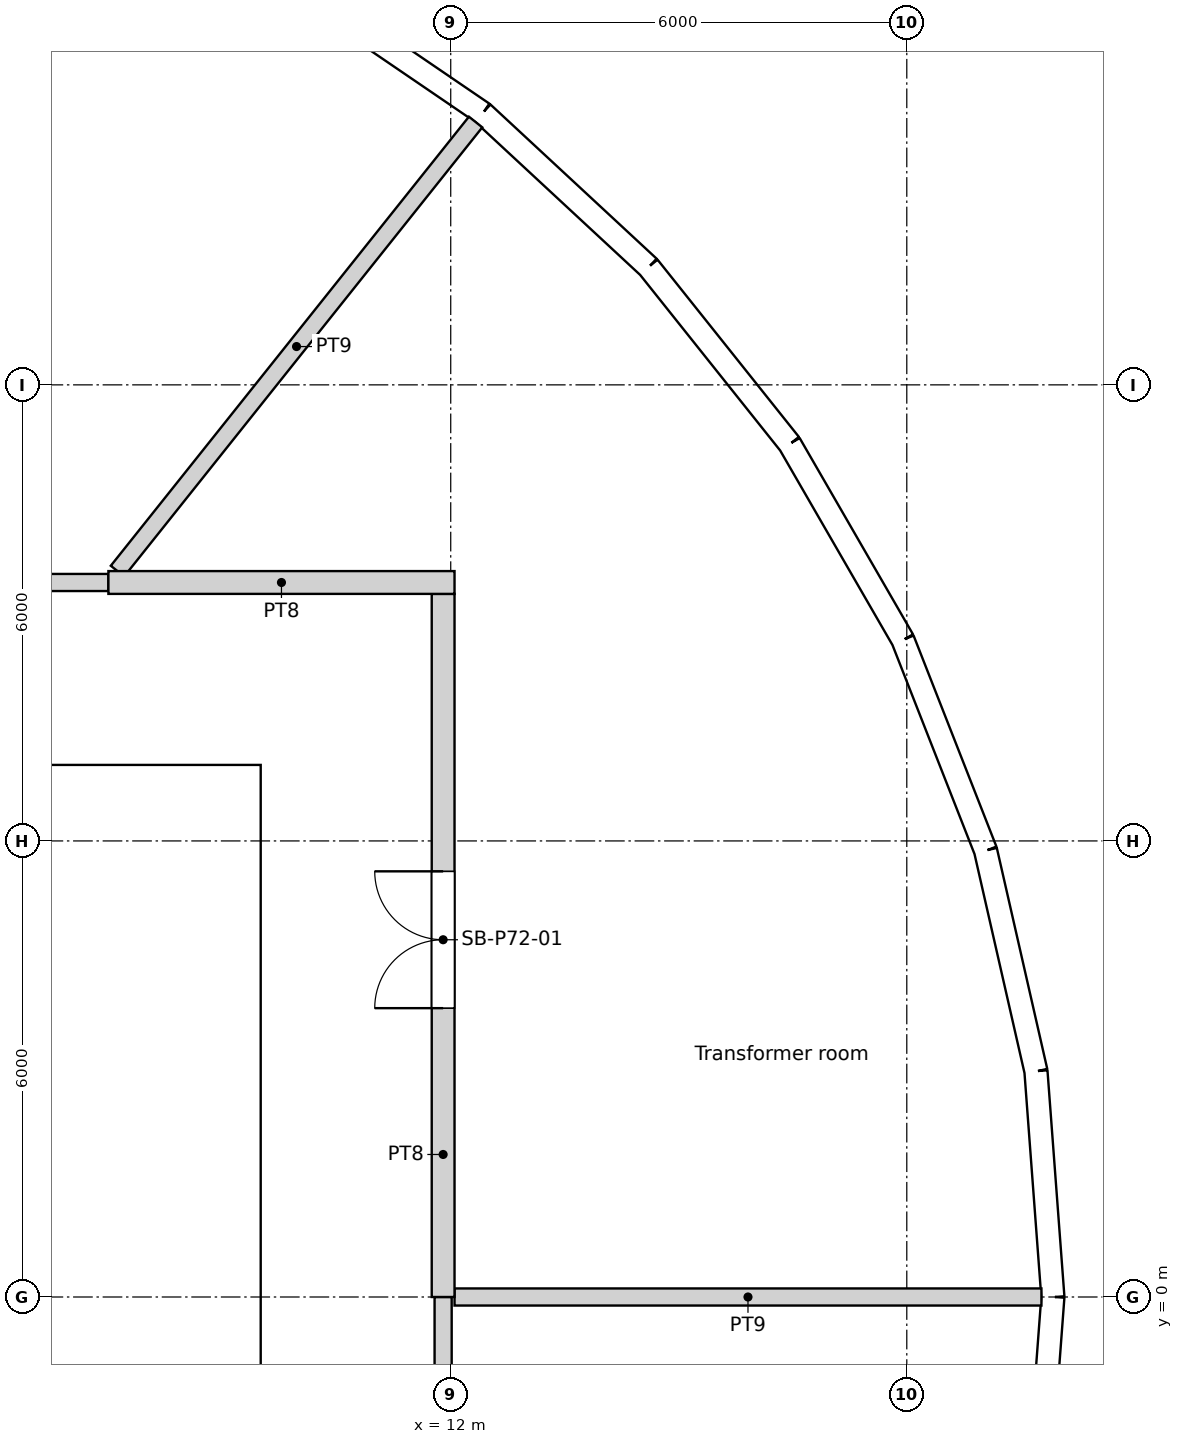
"""IFC4 building model, lengths in metres.
Left out: names, types, materials, properties, quantities, classifications, styles, units other than length and angle.
Written with IfcOpenShell. Run it as: python <this file> out.ifc"""

import sys

from ifc_helpers import new_model, si_unit, direction, frame, frame_2d, origin, origin_2d, place, context, subcontext, project, spatial, rectangle, circle, extrude, element, fill, save


model = new_model("IFC4")
c1 = context("Model", 3, precision=1e-05, world=origin(), true_north=direction((0.0, 1.0)))
c2 = subcontext(c1, "Body", "Model", "MODEL_VIEW")
j1 = project(units=[si_unit("LENGTHUNIT", "METRE"), si_unit("PLANEANGLEUNIT", "RADIAN")], contexts=[c1])
p1 = place(None, origin())
s1 = spatial("IfcSite", under=j1, at=p1, CompositionType="ELEMENT")
p2 = place(p1, origin())
s2 = spatial("IfcBuilding", under=s1, at=p2, CompositionType="ELEMENT")
p3 = place(p2, frame((0.0, 0.0, 277.8)))
s3 = spatial("IfcBuildingStorey", under=s2, at=p3, CompositionType="ELEMENT", Elevation=277.8)
for number, where, z_axis, x_axis in (
    (1, (18.822, 0.0, 0.0), (0.0, 0.0, 1.0), (1.0, 0.0, 0.0)),
    (2, (17.986, 5.548, 0.0), (0.0, 0.0, 1.0), (1.0, 0.0, 0.0)),
    (3, (15.552, 10.603, 0.0), (0.0, 0.0, 1.0), (1.0, 0.0, 0.0)),
    (4, (11.735, 14.716, 0.0), (0.0, 0.0, 1.0), (1.0, 0.0, 0.0)),
):
    element("IfcColumn", number, at=place(p3, frame(where, z_axis=z_axis, x_axis=x_axis)), inside=s3, PredefinedType="COLUMN", context=c2, shape_type="SweptSolid", body=[
        extrude(circle(Radius=0.55, at=origin_2d()), origin(), (0.0, 0.0, 1.0), 6.0),
    ])
p4 = place(p3, frame((19.922, 0.0, 0.0), z_axis=(0.0, 0.0, 1.0), x_axis=(-0.074777718064, 0.997200227076, 0.0)))
e5 = element("IfcWall", 5, at=p4, inside=s3, PredefinedType="SOLIDWALL", context=c2, shape_type="SweptSolid", body=[
    extrude(rectangle(XDim=2.978, YDim=0.3, at=frame_2d((1.489, 0.0))), origin(), (0.0, 0.0, 1.0), 5.65),
])
p5 = place(p4, frame((1.489, 0.0, 1.825)))
e6 = element("IfcOpeningElement", 6, at=p5, cuts=e5, PredefinedType="OPENING", context=c2, shape_type="SweptSolid", body=[
    extrude(circle(Radius=1.2, at=origin_2d()), frame((0.0, 0.16, 0.0), z_axis=(0.0, -1.0, 0.0), x_axis=(1.0, 0.0, 0.0)), (0.0, 0.0, 1.0), 0.32),
])
p6 = place(p3, frame((19.699, 2.969, 0.0), z_axis=(0.0, 0.0, 1.0), x_axis=(-0.222535358937, 0.974924619662, 0.0)))
e7 = element("IfcWall", 7, at=p6, inside=s3, PredefinedType="SOLIDWALL", context=c2, shape_type="SweptSolid", body=[
    extrude(rectangle(XDim=2.978, YDim=0.3, at=frame_2d((1.489, 0.0))), origin(), (0.0, 0.0, 1.0), 5.2),
])
p7 = place(p6, frame((1.489, 0.0, 1.825)))
e8 = element("IfcOpeningElement", 8, at=p7, cuts=e7, PredefinedType="OPENING", context=c2, shape_type="SweptSolid", body=[
    extrude(circle(Radius=1.2, at=origin_2d()), frame((0.0, 0.16, 0.0), z_axis=(0.0, -1.0, 0.0), x_axis=(1.0, 0.0, 0.0)), (0.0, 0.0, 1.0), 0.32),
])
p8 = place(p3, frame((19.037, 5.872, 0.0), z_axis=(0.0, 0.0, 1.0), x_axis=(-0.365289571566, 0.930893940739, 0.0)))
e9 = element("IfcWall", 9, at=p8, inside=s3, PredefinedType="SOLIDWALL", context=c2, shape_type="SweptSolid", body=[
    extrude(rectangle(XDim=2.978, YDim=0.3, at=frame_2d((1.489, 0.0))), origin(), (0.0, 0.0, 1.0), 5.65),
])
p9 = place(p8, frame((1.489, 0.0, 1.825)))
e10 = element("IfcOpeningElement", 10, at=p9, cuts=e9, PredefinedType="OPENING", context=c2, shape_type="SweptSolid", body=[
    extrude(circle(Radius=1.2, at=origin_2d()), frame((0.0, 0.16, 0.0), z_axis=(0.0, -1.0, 0.0), x_axis=(1.0, 0.0, 0.0)), (0.0, 0.0, 1.0), 0.32),
])
p10 = place(p3, frame((17.949, 8.644, 0.0), z_axis=(0.0, 0.0, 1.0), x_axis=(-0.500001626982, 0.866024464444, 0.0)))
e11 = element("IfcWall", 11, at=p10, inside=s3, PredefinedType="SOLIDWALL", context=c2, shape_type="SweptSolid", body=[
    extrude(rectangle(XDim=2.978, YDim=0.3, at=frame_2d((1.489, 0.0))), origin(), (0.0, 0.0, 1.0), 5.65),
])
p11 = place(p10, frame((1.489, 0.0, 1.825)))
e12 = element("IfcOpeningElement", 12, at=p11, cuts=e11, PredefinedType="OPENING", context=c2, shape_type="SweptSolid", body=[
    extrude(circle(Radius=1.2, at=origin_2d()), frame((0.0, 0.16, 0.0), z_axis=(0.0, -1.0, 0.0), x_axis=(1.0, 0.0, 0.0)), (0.0, 0.0, 1.0), 0.32),
])
p12 = place(p3, frame((16.46, 11.222, 0.0), z_axis=(0.0, 0.0, 1.0), x_axis=(-0.623494374707, 0.781827835722, 0.0)))
e13 = element("IfcWall", 13, at=p12, inside=s3, PredefinedType="SOLIDWALL", context=c2, shape_type="SweptSolid", body=[
    extrude(rectangle(XDim=2.978, YDim=0.3, at=frame_2d((1.489, 0.0))), origin(), (0.0, 0.0, 1.0), 5.2),
])
p13 = place(p12, frame((1.489, 0.0, 1.825)))
e14 = element("IfcOpeningElement", 14, at=p13, cuts=e13, PredefinedType="OPENING", context=c2, shape_type="SweptSolid", body=[
    extrude(circle(Radius=1.2, at=origin_2d()), frame((0.0, 0.16, 0.0), z_axis=(0.0, -1.0, 0.0), x_axis=(1.0, 0.0, 0.0)), (0.0, 0.0, 1.0), 0.32),
])
p14 = place(p3, frame((14.604, 13.55, 0.0), z_axis=(0.0, 0.0, 1.0), x_axis=(-0.733056277766, 0.68016798927, 0.0)))
e15 = element("IfcWall", 15, at=p14, inside=s3, PredefinedType="SOLIDWALL", context=c2, shape_type="SweptSolid", body=[
    extrude(rectangle(XDim=2.978, YDim=0.3, at=frame_2d((1.489, 0.0))), origin(), (0.0, 0.0, 1.0), 5.65),
])
p15 = place(p14, frame((1.489, 0.0, 1.825)))
e16 = element("IfcOpeningElement", 16, at=p15, cuts=e15, PredefinedType="OPENING", context=c2, shape_type="SweptSolid", body=[
    extrude(circle(Radius=1.2, at=origin_2d()), frame((0.0, 0.16, 0.0), z_axis=(0.0, -1.0, 0.0), x_axis=(1.0, 0.0, 0.0)), (0.0, 0.0, 1.0), 0.32),
])
p16 = place(p3, frame((12.421, 15.575, 0.0), z_axis=(0.0, 0.0, 1.0), x_axis=(-0.826253362584, 0.56329866041, 0.0)))
e17 = element("IfcWall", 17, at=p16, inside=s3, PredefinedType="SOLIDWALL", context=c2, shape_type="SweptSolid", body=[
    extrude(rectangle(XDim=2.978, YDim=0.3, at=frame_2d((1.489, 0.0))), origin(), (0.0, 0.0, 1.0), 5.65),
])
p17 = place(p16, frame((1.489, 0.0, 1.825)))
e18 = element("IfcOpeningElement", 18, at=p17, cuts=e17, PredefinedType="OPENING", context=c2, shape_type="SweptSolid", body=[
    extrude(circle(Radius=1.2, at=origin_2d()), frame((0.0, 0.16, 0.0), z_axis=(0.0, -1.0, 0.0), x_axis=(1.0, 0.0, 0.0)), (0.0, 0.0, 1.0), 0.32),
])
p18 = place(p3, frame((19.699, -2.969, 0.0), z_axis=(0.0, 0.0, 1.0), x_axis=(0.074777718064, 0.997200227076, 0.0)))
e19 = element("IfcWall", 19, at=p18, inside=s3, PredefinedType="SOLIDWALL", context=c2, shape_type="SweptSolid", body=[
    extrude(rectangle(XDim=2.978, YDim=0.3, at=frame_2d((1.489, 0.0))), origin(), (0.0, 0.0, 1.0), 5.65),
])
p19 = place(p18, frame((1.489, 0.0, 1.825)))
e20 = element("IfcOpeningElement", 20, at=p19, cuts=e19, PredefinedType="OPENING", context=c2, shape_type="SweptSolid", body=[
    extrude(circle(Radius=1.2, at=origin_2d()), frame((0.0, 0.16, 0.0), z_axis=(0.0, -1.0, 0.0), x_axis=(1.0, 0.0, 0.0)), (0.0, 0.0, 1.0), 0.32),
])
p20 = place(p3, frame((-9.5, 6.7, 0.0), z_axis=(0.0, 0.0, 1.0), x_axis=(1.0, 0.0, 0.0)))
e21 = element("IfcWall", 21, at=p20, inside=s3, PredefinedType="SOLIDWALL", context=c2, shape_type="SweptSolid", body=[
    extrude(rectangle(XDim=19.0, YDim=0.6, at=frame_2d((9.5, 0.0))), origin(), (0.0, 0.0, 1.0), 6.0),
])
p21 = place(p20, frame((5.35, 0.0, 0.0)))
e22 = element("IfcOpeningElement", 22, at=p21, cuts=e21, PredefinedType="OPENING", context=c2, shape_type="SweptSolid", body=[
    extrude(rectangle(XDim=1.7, YDim=2.1, at=frame_2d((0.85, 1.05))), frame((0.0, 0.3, 0.0), z_axis=(0.0, -1.0, 0.0), x_axis=(1.0, 0.0, 0.0)), (0.0, 0.0, 1.0), 0.6),
])
p22 = place(p3, frame((9.2, -6.4, 0.0), z_axis=(0.0, 0.0, 1.0), x_axis=(0.0, 1.0, 0.0)))
e23 = element("IfcWall", 23, at=p22, inside=s3, PredefinedType="SOLIDWALL", context=c2, shape_type="SweptSolid", body=[
    extrude(rectangle(XDim=12.8, YDim=0.6, at=frame_2d((6.4, 0.0))), origin(), (0.0, 0.0, 1.0), 6.0),
])
p23 = place(p22, frame((6.4, 0.0, 0.0)))
e24 = element("IfcOpeningElement", 24, at=p23, cuts=e23, PredefinedType="OPENING", context=c2, shape_type="SweptSolid", body=[
    extrude(rectangle(XDim=1.8, YDim=2.1, at=frame_2d((0.9, 1.05))), frame((0.0, 0.3, 0.0), z_axis=(0.0, -1.0, 0.0), x_axis=(1.0, 0.0, 0.0)), (0.0, 0.0, 1.0), 0.6),
])
p24 = place(p3, frame((-4.35, 3.1, 0.0), z_axis=(0.0, 0.0, 1.0), x_axis=(1.0, 0.0, 0.0)))
e25 = element("IfcWall", 25, at=p24, inside=s3, PredefinedType="SOLIDWALL", context=c2, shape_type="SweptSolid", body=[
    extrude(rectangle(XDim=13.25, YDim=0.3, at=frame_2d((6.625, 0.0))), origin(), (0.0, 0.0, 1.0), 5.65),
])
p25 = place(p3, frame((7.496, 9.4, 0.0), z_axis=(0.0, 0.0, 1.0), x_axis=(-1.0, 0.0, 0.0)))
e26 = element("IfcWall", 26, at=p25, inside=s3, PredefinedType="PARTITIONING", context=c2, shape_type="SweptSolid", body=[
    extrude(rectangle(XDim=6.792, YDim=0.225, at=frame_2d((3.396, 0.0))), origin(), (0.0, 0.0, 1.0), 5.65),
])
p26 = place(p25, frame((2.496, 0.0, 0.0)))
e27 = element("IfcOpeningElement", 27, at=p26, cuts=e26, PredefinedType="OPENING", context=c2, shape_type="SweptSolid", body=[
    extrude(rectangle(XDim=1.8, YDim=2.4, at=frame_2d((0.9, 1.2))), frame((0.0, 0.113, 0.0), z_axis=(0.0, -1.0, 0.0), x_axis=(1.0, 0.0, 0.0)), (0.0, 0.0, 1.0), 0.225),
])
p27 = place(p3, frame((11.9, -9.512, 0.0), z_axis=(0.0, 0.0, 1.0), x_axis=(0.0, 1.0, 0.0)))
e28 = element("IfcWall", 28, at=p27, inside=s3, PredefinedType="PARTITIONING", context=c2, shape_type="SweptSolid", body=[
    extrude(rectangle(XDim=9.512, YDim=0.225, at=frame_2d((4.756, 0.0))), origin(), (0.0, 0.0, 1.0), 5.65),
])
p28 = place(p27, frame((4.312, 0.0, 0.0)))
e29 = element("IfcOpeningElement", 29, at=p28, cuts=e28, PredefinedType="OPENING", context=c2, shape_type="SweptSolid", body=[
    extrude(rectangle(XDim=1.0, YDim=2.1, at=frame_2d((0.5, 1.05))), frame((0.0, 0.113, 0.0), z_axis=(0.0, -1.0, 0.0), x_axis=(1.0, 0.0, 0.0)), (0.0, 0.0, 1.0), 0.225),
])
p29 = place(p3, frame((11.9, 0.0, 0.0), z_axis=(0.0, 0.0, 1.0), x_axis=(0.0, 1.0, 0.0)))
e30 = element("IfcWall", 30, at=p29, inside=s3, PredefinedType="PARTITIONING", context=c2, shape_type="SweptSolid", body=[
    extrude(rectangle(XDim=9.25, YDim=0.3, at=frame_2d((4.625, 0.0))), origin(), (0.0, 0.0, 1.0), 5.65),
])
p30 = place(p29, frame((3.8, 0.0, 0.0)))
e31 = element("IfcOpeningElement", 31, at=p30, cuts=e30, PredefinedType="OPENING", context=c2, shape_type="SweptSolid", body=[
    extrude(rectangle(XDim=1.8, YDim=2.4, at=frame_2d((0.9, 1.2))), frame((0.0, 0.15, 0.0), z_axis=(0.0, -1.0, 0.0), x_axis=(1.0, 0.0, 0.0)), (0.0, 0.0, 1.0), 0.3),
])
p31 = place(p3, frame((12.05, 9.4, 0.0), z_axis=(0.0, 0.0, 1.0), x_axis=(-1.0, 0.0, 0.0)))
e32 = element("IfcWall", 32, at=p31, inside=s3, PredefinedType="PARTITIONING", context=c2, shape_type="SweptSolid", body=[
    extrude(rectangle(XDim=4.554, YDim=0.3, at=frame_2d((2.277, 0.0))), origin(), (0.0, 0.0, 1.0), 5.65),
])
p32 = place(p3, frame((12.327, 15.458, 0.0), z_axis=(0.0, 0.0, 1.0), x_axis=(-0.623488645806, -0.781832404388, 0.0)))
e33 = element("IfcWall", 33, at=p32, inside=s3, PredefinedType="PARTITIONING", context=c2, shape_type="SweptSolid", body=[
    extrude(rectangle(XDim=7.557, YDim=0.225, at=frame_2d((3.778, 0.0))), origin(), (0.0, 0.0, 1.0), 2.7),
])
p33 = place(p3, frame((19.771, 0.0, 0.0), z_axis=(0.0, 0.0, 1.0), x_axis=(-1.0, 0.0, 0.0)))
e34 = element("IfcWall", 34, at=p33, inside=s3, PredefinedType="PARTITIONING", context=c2, shape_type="SweptSolid", body=[
    extrude(rectangle(XDim=7.721, YDim=0.225, at=frame_2d((3.861, 0.0))), origin(), (0.0, 0.0, 1.0), 2.7),
])
p34 = place(p5, origin())
e35 = element("IfcWindow", 35, at=p34, inside=s3, PartitioningType="SINGLE_PANEL", PredefinedType="WINDOW", context=c2, shape_type="SweptSolid", body=[
    extrude(circle(Radius=1.2, at=origin_2d()), frame((0.0, 0.12, 0.0), z_axis=(0.0, -1.0, 0.0), x_axis=(1.0, 0.0, 0.0)), (0.0, 0.0, 1.0), 0.1),
])
fill(e6, e35)
p35 = place(p7, origin())
e36 = element("IfcWindow", 36, at=p35, inside=s3, PartitioningType="SINGLE_PANEL", PredefinedType="WINDOW", context=c2, shape_type="SweptSolid", body=[
    extrude(circle(Radius=1.2, at=origin_2d()), frame((0.0, 0.12, 0.0), z_axis=(0.0, -1.0, 0.0), x_axis=(1.0, 0.0, 0.0)), (0.0, 0.0, 1.0), 0.1),
])
fill(e8, e36)
p36 = place(p9, origin())
e37 = element("IfcWindow", 37, at=p36, inside=s3, PartitioningType="SINGLE_PANEL", PredefinedType="WINDOW", context=c2, shape_type="SweptSolid", body=[
    extrude(circle(Radius=1.2, at=origin_2d()), frame((0.0, 0.12, 0.0), z_axis=(0.0, -1.0, 0.0), x_axis=(1.0, 0.0, 0.0)), (0.0, 0.0, 1.0), 0.1),
])
fill(e10, e37)
p37 = place(p11, origin())
e38 = element("IfcWindow", 38, at=p37, inside=s3, PartitioningType="SINGLE_PANEL", PredefinedType="WINDOW", context=c2, shape_type="SweptSolid", body=[
    extrude(circle(Radius=1.2, at=origin_2d()), frame((0.0, 0.12, 0.0), z_axis=(0.0, -1.0, 0.0), x_axis=(1.0, 0.0, 0.0)), (0.0, 0.0, 1.0), 0.1),
])
fill(e12, e38)
p38 = place(p13, origin())
e39 = element("IfcWindow", 39, at=p38, inside=s3, PartitioningType="SINGLE_PANEL", PredefinedType="WINDOW", context=c2, shape_type="SweptSolid", body=[
    extrude(circle(Radius=1.2, at=origin_2d()), frame((0.0, 0.12, 0.0), z_axis=(0.0, -1.0, 0.0), x_axis=(1.0, 0.0, 0.0)), (0.0, 0.0, 1.0), 0.1),
])
fill(e14, e39)
p39 = place(p15, origin())
e40 = element("IfcWindow", 40, at=p39, inside=s3, PartitioningType="SINGLE_PANEL", PredefinedType="WINDOW", context=c2, shape_type="SweptSolid", body=[
    extrude(circle(Radius=1.2, at=origin_2d()), frame((0.0, 0.12, 0.0), z_axis=(0.0, -1.0, 0.0), x_axis=(1.0, 0.0, 0.0)), (0.0, 0.0, 1.0), 0.1),
])
fill(e16, e40)
p40 = place(p17, origin())
e41 = element("IfcWindow", 41, at=p40, inside=s3, PartitioningType="SINGLE_PANEL", PredefinedType="WINDOW", context=c2, shape_type="SweptSolid", body=[
    extrude(circle(Radius=1.2, at=origin_2d()), frame((0.0, 0.12, 0.0), z_axis=(0.0, -1.0, 0.0), x_axis=(1.0, 0.0, 0.0)), (0.0, 0.0, 1.0), 0.1),
])
fill(e18, e41)
p41 = place(p19, origin())
e42 = element("IfcWindow", 42, at=p41, inside=s3, PartitioningType="SINGLE_PANEL", PredefinedType="WINDOW", context=c2, shape_type="SweptSolid", body=[
    extrude(circle(Radius=1.2, at=origin_2d()), frame((0.0, 0.12, 0.0), z_axis=(0.0, -1.0, 0.0), x_axis=(1.0, 0.0, 0.0)), (0.0, 0.0, 1.0), 0.1),
])
fill(e20, e42)
p42 = place(p23, origin())
e43 = element("IfcDoor", 43, at=p42, inside=s3, OperationType="DOUBLE_DOOR_SINGLE_SWING", PredefinedType="DOOR", context=c2, shape_type="SweptSolid", body=[
    extrude(rectangle(XDim=1.8, YDim=2.1, at=frame_2d((0.9, 1.05))), frame((0.0, 0.025, 0.0), z_axis=(0.0, -1.0, 0.0), x_axis=(1.0, 0.0, 0.0)), (0.0, 0.0, 1.0), 0.05),
])
fill(e24, e43)
p43 = place(p30, origin())
e44 = element("IfcDoor", 44, at=p43, inside=s3, OperationType="DOUBLE_DOOR_SINGLE_SWING", PredefinedType="DOOR", context=c2, shape_type="SweptSolid", body=[
    extrude(rectangle(XDim=1.8, YDim=2.4, at=frame_2d((0.9, 1.2))), frame((0.0, 0.025, 0.0), z_axis=(0.0, -1.0, 0.0), x_axis=(1.0, 0.0, 0.0)), (0.0, 0.0, 1.0), 0.05),
])
fill(e31, e44)
save(model, sys.argv[1])
